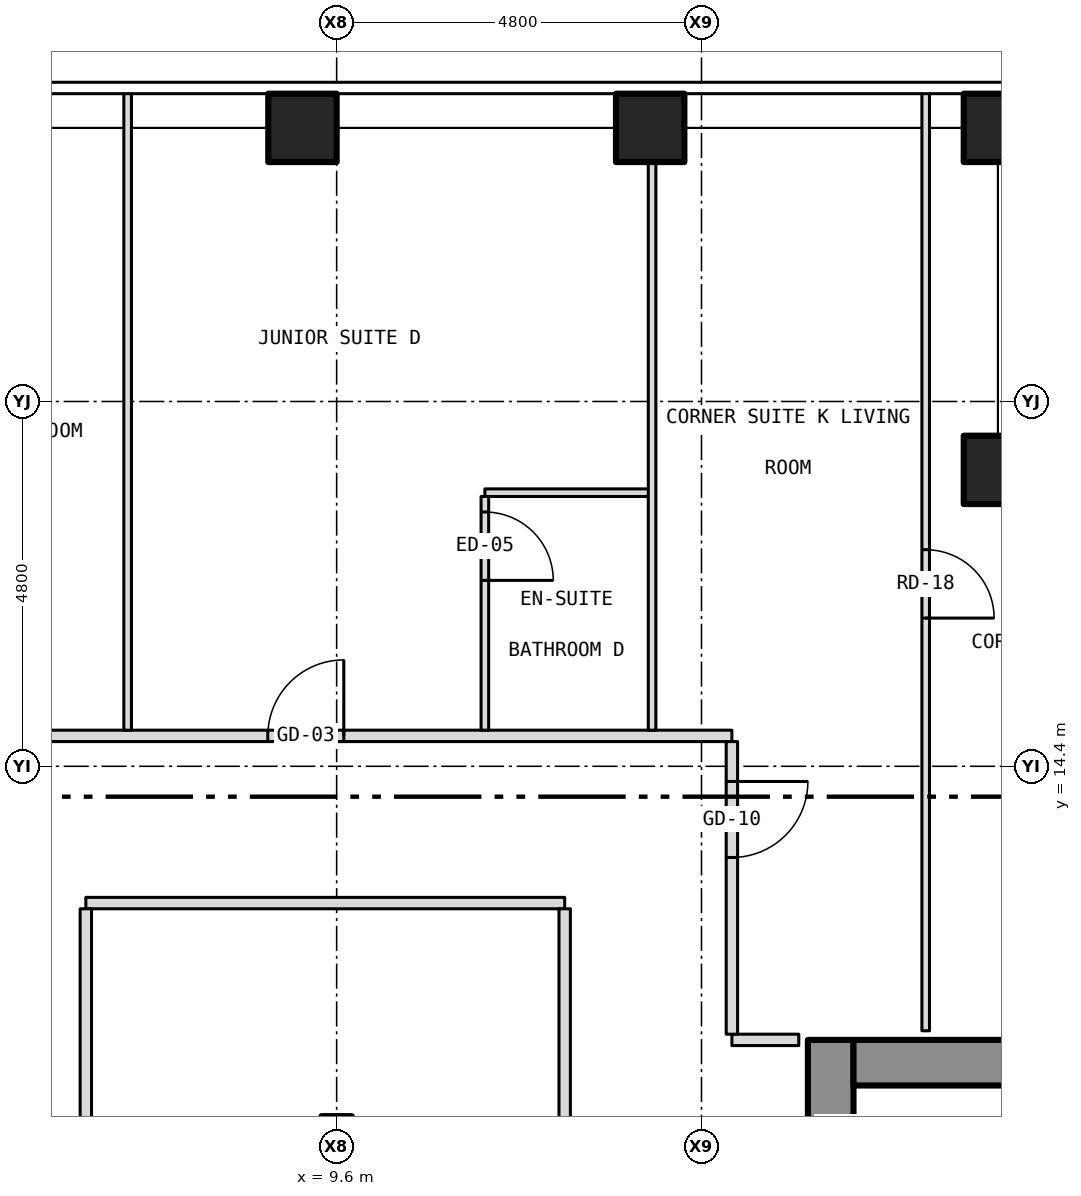
"""IFC4 building model, lengths in metres.
Left out: names, types, materials, properties, quantities, classifications, styles, units other than length and angle.
Written with IfcOpenShell. Run it as: python <this file> out.ifc"""

import sys

from ifc_helpers import new_model, si_unit, direction, frame, frame_2d, origin, origin_2d, place, context, subcontext, project, spatial, rectangle, hollow_rectangle, extrude, element, fill, save


model = new_model("IFC4")
c1 = context("Model", 3, precision=1e-05, world=origin(), true_north=direction((0.0, 1.0)))
c2 = subcontext(c1, "Body", "Model", "MODEL_VIEW")
j1 = project(units=[si_unit("LENGTHUNIT", "METRE"), si_unit("PLANEANGLEUNIT", "RADIAN")], contexts=[c1])
p1 = place(None, origin())
s1 = spatial("IfcSite", under=j1, at=p1, CompositionType="ELEMENT")
p2 = place(p1, origin())
s2 = spatial("IfcBuilding", under=s1, at=p2, CompositionType="ELEMENT")
p3 = place(p2, frame((0.0, 0.0, 113.5)))
s3 = spatial("IfcBuildingStorey", under=s2, at=p3, CompositionType="ELEMENT", Elevation=113.5)
for number, where, z_axis, x_axis in (
    (1, (9.15, 22.8, -0.15), (0.0, 0.0, 1.0), (1.0, 0.0, 0.0)),
    (2, (13.725, 22.8, -0.15), (0.0, 0.0, 1.0), (1.0, 0.0, 0.0)),
    (3, (18.3, 22.8, -0.15), (0.0, 0.0, 1.0), (1.0, 0.0, 0.0)),
    (4, (18.3, 18.3, -0.15), (0.0, 0.0, 1.0), (1.0, 0.0, 0.0)),
):
    element("IfcColumn", number, at=place(p3, frame(where, z_axis=z_axis, x_axis=x_axis)), inside=s3, PredefinedType="COLUMN", context=c2, shape_type="SweptSolid", body=[
        extrude(hollow_rectangle(XDim=0.9, YDim=0.9, WallThickness=0.05, at=origin_2d()), origin(), (0.0, 0.0, 1.0), 3.5),
    ])
p4 = place(p3, frame((16.1, -10.8, 0.0), z_axis=(0.0, 0.0, 1.0), x_axis=(0.0, 1.0, 0.0)))
e5 = element("IfcWall", 5, at=p4, inside=s3, PredefinedType="SHEAR", context=c2, shape_type="SweptSolid", body=[
    extrude(rectangle(XDim=21.6, YDim=0.6, at=frame_2d((10.8, 0.0))), origin(), (0.0, 0.0, 1.0), 3.25),
])
p5 = place(p4, frame((9.4, 0.0, 0.0)))
e6 = element("IfcOpeningElement", 6, at=p5, cuts=e5, PredefinedType="OPENING", context=c2, shape_type="SweptSolid", body=[
    extrude(rectangle(XDim=1.1, YDim=2.1, at=frame_2d((0.55, 1.05))), frame((0.0, 0.312, 0.0), z_axis=(0.0, -1.0, 0.0), x_axis=(1.0, 0.0, 0.0)), (0.0, 0.0, 1.0), 0.624),
])
p6 = place(p4, frame((11.5, 0.0, 0.0)))
e7 = element("IfcOpeningElement", 7, at=p6, cuts=e5, PredefinedType="OPENING", context=c2, shape_type="SweptSolid", body=[
    extrude(rectangle(XDim=1.1, YDim=2.1, at=frame_2d((0.55, 1.05))), frame((0.0, 0.312, 0.0), z_axis=(0.0, -1.0, 0.0), x_axis=(1.0, 0.0, 0.0)), (0.0, 0.0, 1.0), 0.624),
])
p7 = place(p4, frame((13.6, 0.0, 0.0)))
e8 = element("IfcOpeningElement", 8, at=p7, cuts=e5, PredefinedType="OPENING", context=c2, shape_type="SweptSolid", body=[
    extrude(rectangle(XDim=1.1, YDim=2.1, at=frame_2d((0.55, 1.05))), frame((0.0, 0.312, 0.0), z_axis=(0.0, -1.0, 0.0), x_axis=(1.0, 0.0, 0.0)), (0.0, 0.0, 1.0), 0.624),
])
p8 = place(p4, frame((15.7, 0.0, 0.0)))
e9 = element("IfcOpeningElement", 9, at=p8, cuts=e5, PredefinedType="OPENING", context=c2, shape_type="SweptSolid", body=[
    extrude(rectangle(XDim=1.1, YDim=2.1, at=frame_2d((0.55, 1.05))), frame((0.0, 0.312, 0.0), z_axis=(0.0, -1.0, 0.0), x_axis=(1.0, 0.0, 0.0)), (0.0, 0.0, 1.0), 0.624),
])
p9 = place(p4, frame((17.8, 0.0, 0.0)))
e10 = element("IfcOpeningElement", 10, at=p9, cuts=e5, PredefinedType="OPENING", context=c2, shape_type="SweptSolid", body=[
    extrude(rectangle(XDim=1.1, YDim=2.1, at=frame_2d((0.55, 1.05))), frame((0.0, 0.312, 0.0), z_axis=(0.0, -1.0, 0.0), x_axis=(1.0, 0.0, 0.0)), (0.0, 0.0, 1.0), 0.624),
])
p10 = place(p4, frame((5.642, 0.0, 0.0)))
e11 = element("IfcOpeningElement", 11, at=p10, cuts=e5, PredefinedType="OPENING", context=c2, shape_type="SweptSolid", body=[
    extrude(rectangle(XDim=1.1, YDim=2.1, at=frame_2d((0.55, 1.05))), frame((0.0, 0.312, 0.0), z_axis=(0.0, -1.0, 0.0), x_axis=(1.0, 0.0, 0.0)), (0.0, 0.0, 1.0), 0.624),
])
p11 = place(p4, frame((7.5, 0.0, 0.0)))
e12 = element("IfcOpeningElement", 12, at=p11, cuts=e5, PredefinedType="OPENING", context=c2, shape_type="SweptSolid", body=[
    extrude(rectangle(XDim=1.1, YDim=2.1, at=frame_2d((0.55, 1.05))), frame((0.0, 0.312, 0.0), z_axis=(0.0, -1.0, 0.0), x_axis=(1.0, 0.0, 0.0)), (0.0, 0.0, 1.0), 0.624),
])
p12 = place(p3, frame((16.4, 10.5, 0.0), z_axis=(0.0, 0.0, 1.0), x_axis=(1.0, 0.0, 0.0)))
e13 = element("IfcWall", 13, at=p12, inside=s3, PredefinedType="SHEAR", context=c2, shape_type="SweptSolid", body=[
    extrude(rectangle(XDim=5.8, YDim=0.6, at=frame_2d((2.9, 0.0))), origin(), (0.0, 0.0, 1.0), 3.25),
])
p13 = place(p3, frame((14.8, 10.8, 0.0), z_axis=(0.0, 0.0, 1.0), x_axis=(1.0, 0.0, 0.0)))
e14 = element("IfcWall", 14, at=p13, inside=s3, PredefinedType="PARTITIONING", context=c2, shape_type="SweptSolid", body=[
    extrude(rectangle(XDim=0.88, YDim=0.15, at=frame_2d((0.44, 0.0))), origin(), (0.0, 0.0, 1.0), 3.35),
])
p14 = place(p3, frame((6.3, 12.6, 0.0), z_axis=(0.0, 0.0, 1.0), x_axis=(1.0, 0.0, 0.0)))
e15 = element("IfcWall", 15, at=p14, inside=s3, PredefinedType="PARTITIONING", context=c2, shape_type="SweptSolid", body=[
    extrude(rectangle(XDim=6.3, YDim=0.15, at=frame_2d((3.15, 0.0))), origin(), (0.0, 0.0, 1.0), 3.35),
])
p15 = place(p3, frame((-14.8, 14.8, 0.0), z_axis=(0.0, 0.0, 1.0), x_axis=(1.0, 0.0, 0.0)))
e16 = element("IfcWall", 16, at=p15, inside=s3, PredefinedType="PARTITIONING", context=c2, shape_type="SweptSolid", body=[
    extrude(rectangle(XDim=29.6, YDim=0.15, at=frame_2d((14.8, 0.0))), origin(), (0.0, 0.0, 1.0), 3.35),
])
p16 = place(p15, frame((2.913, 0.0, 0.0)))
e17 = element("IfcOpeningElement", 17, at=p16, cuts=e16, PredefinedType="OPENING", context=c2, shape_type="SweptSolid", body=[
    extrude(rectangle(XDim=0.9, YDim=2.1, at=frame_2d((0.45, 1.05))), frame((0.0, 0.087, 0.0), z_axis=(0.0, -1.0, 0.0), x_axis=(1.0, 0.0, 0.0)), (0.0, 0.0, 1.0), 0.174),
])
p17 = place(p15, frame((7.481, 0.0, 0.0)))
e18 = element("IfcOpeningElement", 18, at=p17, cuts=e16, PredefinedType="OPENING", context=c2, shape_type="SweptSolid", body=[
    extrude(rectangle(XDim=1.0, YDim=2.1, at=frame_2d((0.5, 1.05))), frame((0.0, 0.087, 0.0), z_axis=(0.0, -1.0, 0.0), x_axis=(1.0, 0.0, 0.0)), (0.0, 0.0, 1.0), 0.174),
])
p18 = place(p15, frame((19.104, 0.0, 0.0)))
e19 = element("IfcOpeningElement", 19, at=p18, cuts=e16, PredefinedType="OPENING", context=c2, shape_type="SweptSolid", body=[
    extrude(rectangle(XDim=1.0, YDim=2.1, at=frame_2d((0.5, 1.05))), frame((0.0, 0.087, 0.0), z_axis=(0.0, -1.0, 0.0), x_axis=(1.0, 0.0, 0.0)), (0.0, 0.0, 1.0), 0.174),
])
p19 = place(p15, frame((23.494, 0.0, 0.0)))
e20 = element("IfcOpeningElement", 20, at=p19, cuts=e16, PredefinedType="OPENING", context=c2, shape_type="SweptSolid", body=[
    extrude(rectangle(XDim=1.0, YDim=2.1, at=frame_2d((0.5, 1.05))), frame((0.0, 0.087, 0.0), z_axis=(0.0, -1.0, 0.0), x_axis=(1.0, 0.0, 0.0)), (0.0, 0.0, 1.0), 0.174),
])
p20 = place(p3, frame((11.55, 18.0, 0.0), z_axis=(0.0, 0.0, 1.0), x_axis=(1.0, 0.0, 0.0)))
e21 = element("IfcWall", 21, at=p20, inside=s3, PredefinedType="PARTITIONING", context=c2, shape_type="SweptSolid", body=[
    extrude(rectangle(XDim=2.2, YDim=0.1, at=frame_2d((1.1, 0.0))), origin(), (0.0, 0.0, 1.0), 3.35),
])
p21 = place(p3, frame((6.3, 4.875, 0.0), z_axis=(0.0, 0.0, 1.0), x_axis=(0.0, 1.0, 0.0)))
e22 = element("IfcWall", 22, at=p21, inside=s3, PredefinedType="PARTITIONING", context=c2, shape_type="SweptSolid", body=[
    extrude(rectangle(XDim=7.65, YDim=0.15, at=frame_2d((3.825, 0.0))), origin(), (0.0, 0.0, 1.0), 3.35),
])
p22 = place(p21, frame((3.375, 0.0, 0.0)))
e23 = element("IfcOpeningElement", 23, at=p22, cuts=e22, PredefinedType="OPENING", context=c2, shape_type="SweptSolid", body=[
    extrude(rectangle(XDim=0.9, YDim=2.1, at=frame_2d((0.45, 1.05))), frame((0.0, 0.087, 0.0), z_axis=(0.0, -1.0, 0.0), x_axis=(1.0, 0.0, 0.0)), (0.0, 0.0, 1.0), 0.174),
])
p23 = place(p3, frame((6.85, 14.875, 0.0), z_axis=(0.0, 0.0, 1.0), x_axis=(0.0, 1.0, 0.0)))
e24 = element("IfcWall", 24, at=p23, inside=s3, PredefinedType="PARTITIONING", context=c2, shape_type="SweptSolid", body=[
    extrude(rectangle(XDim=8.405, YDim=0.1, at=frame_2d((4.203, 0.0))), origin(), (0.0, 0.0, 1.0), 3.35),
])
p24 = place(p3, frame((11.55, 14.875, 0.0), z_axis=(0.0, 0.0, 1.0), x_axis=(0.0, 1.0, 0.0)))
e25 = element("IfcWall", 25, at=p24, inside=s3, PredefinedType="PARTITIONING", context=c2, shape_type="SweptSolid", body=[
    extrude(rectangle(XDim=3.075, YDim=0.1, at=frame_2d((1.538, 0.0))), origin(), (0.0, 0.0, 1.0), 3.35),
])
p25 = place(p24, frame((1.971, 0.0, 0.0)))
e26 = element("IfcOpeningElement", 26, at=p25, cuts=e25, PredefinedType="OPENING", context=c2, shape_type="SweptSolid", body=[
    extrude(rectangle(XDim=0.9, YDim=2.1, at=frame_2d((0.45, 1.05))), frame((0.0, 0.062, 0.0), z_axis=(0.0, -1.0, 0.0), x_axis=(1.0, 0.0, 0.0)), (0.0, 0.0, 1.0), 0.124),
])
p26 = place(p3, frame((12.6, 4.875, 0.0), z_axis=(0.0, 0.0, 1.0), x_axis=(0.0, 1.0, 0.0)))
e27 = element("IfcWall", 27, at=p26, inside=s3, PredefinedType="PARTITIONING", context=c2, shape_type="SweptSolid", body=[
    extrude(rectangle(XDim=7.65, YDim=0.15, at=frame_2d((3.825, 0.0))), origin(), (0.0, 0.0, 1.0), 3.35),
])
p27 = place(p3, frame((13.75, 14.875, 0.0), z_axis=(0.0, 0.0, 1.0), x_axis=(0.0, 1.0, 0.0)))
e28 = element("IfcWall", 28, at=p27, inside=s3, PredefinedType="PARTITIONING", context=c2, shape_type="SweptSolid", body=[
    extrude(rectangle(XDim=7.805, YDim=0.1, at=frame_2d((3.902, 0.0))), origin(), (0.0, 0.0, 1.0), 3.35),
])
p28 = place(p3, frame((14.8, 10.875, 0.0), z_axis=(0.0, 0.0, 1.0), x_axis=(0.0, 1.0, 0.0)))
e29 = element("IfcWall", 29, at=p28, inside=s3, PredefinedType="PARTITIONING", context=c2, shape_type="SweptSolid", body=[
    extrude(rectangle(XDim=3.85, YDim=0.15, at=frame_2d((1.925, 0.0))), origin(), (0.0, 0.0, 1.0), 3.35),
])
p29 = place(p28, frame((2.325, 0.0, 0.0)))
e30 = element("IfcOpeningElement", 30, at=p29, cuts=e29, PredefinedType="OPENING", context=c2, shape_type="SweptSolid", body=[
    extrude(rectangle(XDim=1.0, YDim=2.1, at=frame_2d((0.5, 1.05))), frame((0.0, 0.087, 0.0), z_axis=(0.0, -1.0, 0.0), x_axis=(1.0, 0.0, 0.0)), (0.0, 0.0, 1.0), 0.174),
])
p30 = place(p3, frame((17.35, 10.92, 0.0), z_axis=(0.0, 0.0, 1.0), x_axis=(0.0, 1.0, 0.0)))
e31 = element("IfcWall", 31, at=p30, inside=s3, PredefinedType="PARTITIONING", context=c2, shape_type="SweptSolid", body=[
    extrude(rectangle(XDim=12.36, YDim=0.1, at=frame_2d((6.18, 0.0))), origin(), (0.0, 0.0, 1.0), 3.35),
])
p31 = place(p30, frame((5.43, 0.0, 0.0)))
e32 = element("IfcOpeningElement", 32, at=p31, cuts=e31, PredefinedType="OPENING", context=c2, shape_type="SweptSolid", body=[
    extrude(rectangle(XDim=0.9, YDim=2.1, at=frame_2d((0.45, 1.05))), frame((0.0, 0.062, 0.0), z_axis=(0.0, -1.0, 0.0), x_axis=(1.0, 0.0, 0.0)), (0.0, 0.0, 1.0), 0.124),
])
p32 = place(p19, origin())
e33 = element("IfcDoor", 33, at=p32, inside=s3, OperationType="SINGLE_SWING_RIGHT", PredefinedType="DOOR", context=c2, shape_type="SweptSolid", body=[
    extrude(rectangle(XDim=1.0, YDim=2.1, at=frame_2d((0.5, 1.05))), frame((0.0, 0.025, 0.0), z_axis=(0.0, -1.0, 0.0), x_axis=(1.0, 0.0, 0.0)), (0.0, 0.0, 1.0), 0.05),
])
fill(e20, e33)
p33 = place(p25, origin())
e34 = element("IfcDoor", 34, at=p33, inside=s3, OperationType="SINGLE_SWING_LEFT", PredefinedType="DOOR", context=c2, shape_type="SweptSolid", body=[
    extrude(rectangle(XDim=0.9, YDim=2.1, at=frame_2d((0.45, 1.05))), frame((0.0, 0.025, 0.0), z_axis=(0.0, -1.0, 0.0), x_axis=(1.0, 0.0, 0.0)), (0.0, 0.0, 1.0), 0.05),
])
fill(e26, e34)
p34 = place(p29, origin())
e35 = element("IfcDoor", 35, at=p34, inside=s3, OperationType="SINGLE_SWING_RIGHT", PredefinedType="DOOR", context=c2, shape_type="SweptSolid", body=[
    extrude(rectangle(XDim=1.0, YDim=2.1, at=frame_2d((0.5, 1.05))), frame((0.0, 0.025, 0.0), z_axis=(0.0, -1.0, 0.0), x_axis=(1.0, 0.0, 0.0)), (0.0, 0.0, 1.0), 0.05),
])
fill(e30, e35)
p35 = place(p31, origin())
e36 = element("IfcDoor", 36, at=p35, inside=s3, OperationType="SINGLE_SWING_LEFT", PredefinedType="DOOR", context=c2, shape_type="SweptSolid", body=[
    extrude(rectangle(XDim=0.9, YDim=2.1, at=frame_2d((0.45, 1.05))), frame((0.0, 0.025, 0.0), z_axis=(0.0, -1.0, 0.0), x_axis=(1.0, 0.0, 0.0)), (0.0, 0.0, 1.0), 0.05),
])
fill(e32, e36)
save(model, sys.argv[1])
